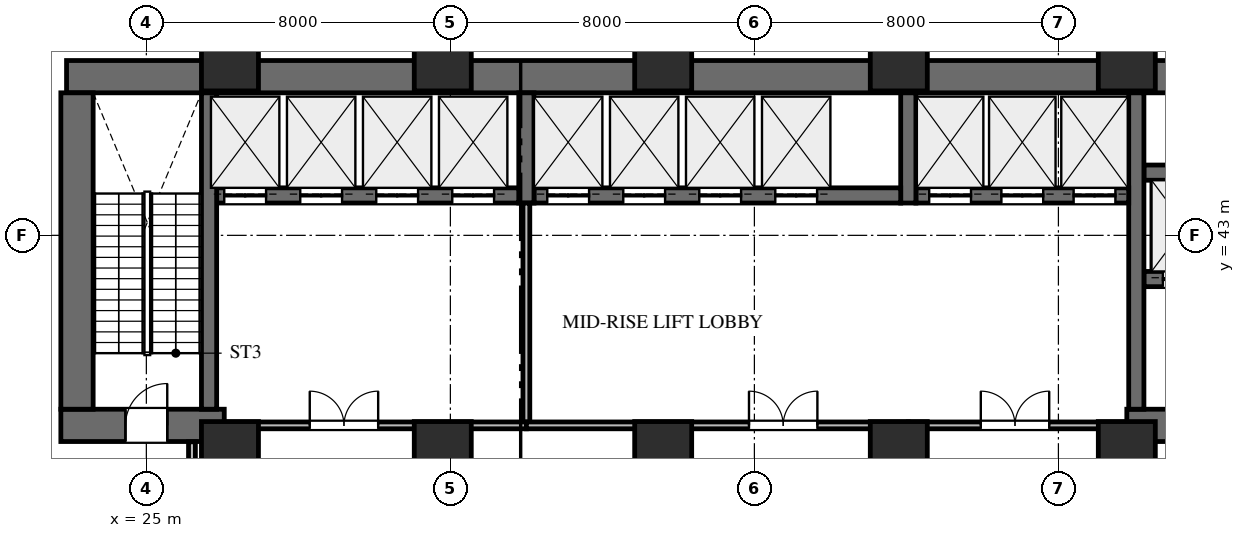
"""IFC4 building model, lengths in metres.
Left out: names, types, materials, properties, quantities, classifications, styles, units other than length and angle.
Written with IfcOpenShell. Run it as: python <this file> out.ifc"""

import sys

from ifc_helpers import new_model, si_unit, direction, frame, frame_2d, origin, origin_2d, place, context, subcontext, project, spatial, rectangle, extrude, element, fill, save


model = new_model("IFC4")
c1 = context("Model", 3, precision=1e-05, world=origin(), true_north=direction((0.0, 1.0)))
c2 = subcontext(c1, "Body", "Model", "MODEL_VIEW")
j1 = project(units=[si_unit("LENGTHUNIT", "METRE"), si_unit("PLANEANGLEUNIT", "RADIAN")], contexts=[c1])
p1 = place(None, origin())
s1 = spatial("IfcSite", under=j1, at=p1, CompositionType="ELEMENT")
p2 = place(p1, origin())
s2 = spatial("IfcBuilding", under=s1, at=p2, CompositionType="ELEMENT")
p3 = place(p2, origin())
s3 = spatial("IfcBuildingStorey", under=s2, at=p3, CompositionType="ELEMENT", Elevation=0.0)
p4 = place(p3, frame((22.9, 47.175, 0.0), z_axis=(0.0, 0.0, 1.0), x_axis=(1.0, 0.0, 0.0)))
e1 = element("IfcWall", 1, at=p4, inside=s3, PredefinedType="SHEAR", context=c2, shape_type="SweptSolid", body=[
    extrude(rectangle(XDim=43.8, YDim=0.85, at=frame_2d((21.9, 0.0))), origin(), (0.0, 0.0, 1.0), 5.4),
])
p5 = place(p3, frame((50.8, 38.0, 0.0), z_axis=(0.0, 0.0, 1.0), x_axis=(1.0, 0.0, 0.0)))
e2 = element("IfcWall", 2, at=p5, inside=s3, PredefinedType="SHEAR", context=c2, shape_type="SweptSolid", body=[
    extrude(rectangle(XDim=5.0, YDim=0.85, at=frame_2d((2.5, 0.0))), origin(), (0.0, 0.0, 1.0), 5.4),
])
p6 = place(p5, frame((2.0, 0.0, 0.0)))
e3 = element("IfcOpeningElement", 3, at=p6, cuts=e2, PredefinedType="OPENING", context=c2, shape_type="SweptSolid", body=[
    extrude(rectangle(XDim=1.2, YDim=2.2, at=frame_2d((0.6, 1.1))), frame((0.0, 0.435, 0.0), z_axis=(0.0, -1.0, 0.0), x_axis=(1.0, 0.0, 0.0)), (0.0, 0.0, 1.0), 0.87),
])
p7 = place(p3, frame((51.25, 41.85, 0.0), z_axis=(0.0, 0.0, 1.0), x_axis=(1.0, 0.0, 0.0)))
e4 = element("IfcWall", 4, at=p7, inside=s3, PredefinedType="SHEAR", context=c2, shape_type="SweptSolid", body=[
    extrude(rectangle(XDim=4.75, YDim=0.4, at=frame_2d((2.375, 0.0))), origin(), (0.0, 0.0, 1.0), 5.4),
])
p8 = place(p7, frame((0.5, 0.0, 0.0)))
e5 = element("IfcOpeningElement", 5, at=p8, cuts=e4, PredefinedType="OPENING", context=c2, shape_type="SweptSolid", body=[
    extrude(rectangle(XDim=1.2, YDim=2.2, at=frame_2d((0.6, 1.1))), frame((0.0, 0.21, 0.0), z_axis=(0.0, -1.0, 0.0), x_axis=(1.0, 0.0, 0.0)), (0.0, 0.0, 1.0), 0.42),
])
p9 = place(p7, frame((2.6, 0.0, 0.0)))
e6 = element("IfcOpeningElement", 6, at=p9, cuts=e4, PredefinedType="OPENING", context=c2, shape_type="SweptSolid", body=[
    extrude(rectangle(XDim=1.2, YDim=2.2, at=frame_2d((0.6, 1.1))), frame((0.0, 0.21, 0.0), z_axis=(0.0, -1.0, 0.0), x_axis=(1.0, 0.0, 0.0)), (0.0, 0.0, 1.0), 0.42),
])
p10 = place(p3, frame((51.25, 44.65, 0.0), z_axis=(0.0, 0.0, 1.0), x_axis=(1.0, 0.0, 0.0)))
e7 = element("IfcWall", 7, at=p10, inside=s3, PredefinedType="SHEAR", context=c2, shape_type="SweptSolid", body=[
    extrude(rectangle(XDim=4.75, YDim=0.4, at=frame_2d((2.375, 0.0))), origin(), (0.0, 0.0, 1.0), 5.4),
])
p11 = place(p3, frame((51.05, 38.425, 0.0), z_axis=(0.0, 0.0, 1.0), x_axis=(0.0, 1.0, 0.0)))
e8 = element("IfcWall", 8, at=p11, inside=s3, PredefinedType="SHEAR", context=c2, shape_type="SweptSolid", body=[
    extrude(rectangle(XDim=8.325, YDim=0.4, at=frame_2d((4.163, 0.0))), origin(), (0.0, 0.0, 1.0), 5.4),
])
p12 = place(p3, frame((45.25, 44.05, 0.0), z_axis=(0.0, 0.0, 1.0), x_axis=(1.0, 0.0, 0.0)))
e9 = element("IfcWall", 9, at=p12, inside=s3, PredefinedType="SHEAR", context=c2, shape_type="SweptSolid", body=[
    extrude(rectangle(XDim=5.6, YDim=0.4, at=frame_2d((2.8, 0.0))), origin(), (0.0, 0.0, 1.0), 5.4),
])
p13 = place(p12, frame((0.35, 0.0, 0.0)))
e10 = element("IfcOpeningElement", 10, at=p13, cuts=e9, PredefinedType="OPENING", context=c2, shape_type="SweptSolid", body=[
    extrude(rectangle(XDim=1.1, YDim=2.2, at=frame_2d((0.55, 1.1))), frame((0.0, 0.21, 0.0), z_axis=(0.0, -1.0, 0.0), x_axis=(1.0, 0.0, 0.0)), (0.0, 0.0, 1.0), 0.42),
])
p14 = place(p12, frame((2.25, 0.0, 0.0)))
e11 = element("IfcOpeningElement", 11, at=p14, cuts=e9, PredefinedType="OPENING", context=c2, shape_type="SweptSolid", body=[
    extrude(rectangle(XDim=1.1, YDim=2.2, at=frame_2d((0.55, 1.1))), frame((0.0, 0.21, 0.0), z_axis=(0.0, -1.0, 0.0), x_axis=(1.0, 0.0, 0.0)), (0.0, 0.0, 1.0), 0.42),
])
p15 = place(p12, frame((4.15, 0.0, 0.0)))
e12 = element("IfcOpeningElement", 12, at=p15, cuts=e9, PredefinedType="OPENING", context=c2, shape_type="SweptSolid", body=[
    extrude(rectangle(XDim=1.1, YDim=2.2, at=frame_2d((0.55, 1.1))), frame((0.0, 0.21, 0.0), z_axis=(0.0, -1.0, 0.0), x_axis=(1.0, 0.0, 0.0)), (0.0, 0.0, 1.0), 0.42),
])
p16 = place(p3, frame((45.05, 43.85, 0.0), z_axis=(0.0, 0.0, 1.0), x_axis=(0.0, 1.0, 0.0)))
e13 = element("IfcWall", 13, at=p16, inside=s3, PredefinedType="SHEAR", context=c2, shape_type="SweptSolid", body=[
    extrude(rectangle(XDim=2.9, YDim=0.4, at=frame_2d((1.45, 0.0))), origin(), (0.0, 0.0, 1.0), 5.4),
])
p17 = place(p3, frame((35.2, 44.05, 0.0), z_axis=(0.0, 0.0, 1.0), x_axis=(1.0, 0.0, 0.0)))
e14 = element("IfcWall", 14, at=p17, inside=s3, PredefinedType="SHEAR", context=c2, shape_type="SweptSolid", body=[
    extrude(rectangle(XDim=9.65, YDim=0.4, at=frame_2d((4.825, 0.0))), origin(), (0.0, 0.0, 1.0), 5.4),
])
p18 = place(p17, frame((0.35, 0.0, 0.0)))
e15 = element("IfcOpeningElement", 15, at=p18, cuts=e14, PredefinedType="OPENING", context=c2, shape_type="SweptSolid", body=[
    extrude(rectangle(XDim=1.1, YDim=2.2, at=frame_2d((0.55, 1.1))), frame((0.0, 0.21, 0.0), z_axis=(0.0, -1.0, 0.0), x_axis=(1.0, 0.0, 0.0)), (0.0, 0.0, 1.0), 0.42),
])
p19 = place(p17, frame((2.35, 0.0, 0.0)))
e16 = element("IfcOpeningElement", 16, at=p19, cuts=e14, PredefinedType="OPENING", context=c2, shape_type="SweptSolid", body=[
    extrude(rectangle(XDim=1.1, YDim=2.2, at=frame_2d((0.55, 1.1))), frame((0.0, 0.21, 0.0), z_axis=(0.0, -1.0, 0.0), x_axis=(1.0, 0.0, 0.0)), (0.0, 0.0, 1.0), 0.42),
])
p20 = place(p17, frame((4.35, 0.0, 0.0)))
e17 = element("IfcOpeningElement", 17, at=p20, cuts=e14, PredefinedType="OPENING", context=c2, shape_type="SweptSolid", body=[
    extrude(rectangle(XDim=1.1, YDim=2.2, at=frame_2d((0.55, 1.1))), frame((0.0, 0.21, 0.0), z_axis=(0.0, -1.0, 0.0), x_axis=(1.0, 0.0, 0.0)), (0.0, 0.0, 1.0), 0.42),
])
p21 = place(p17, frame((6.35, 0.0, 0.0)))
e18 = element("IfcOpeningElement", 18, at=p21, cuts=e14, PredefinedType="OPENING", context=c2, shape_type="SweptSolid", body=[
    extrude(rectangle(XDim=1.1, YDim=2.2, at=frame_2d((0.55, 1.1))), frame((0.0, 0.21, 0.0), z_axis=(0.0, -1.0, 0.0), x_axis=(1.0, 0.0, 0.0)), (0.0, 0.0, 1.0), 0.42),
])
p22 = place(p3, frame((35.0, 43.85, 0.0), z_axis=(0.0, 0.0, 1.0), x_axis=(0.0, 1.0, 0.0)))
e19 = element("IfcWall", 19, at=p22, inside=s3, PredefinedType="SHEAR", context=c2, shape_type="SweptSolid", body=[
    extrude(rectangle(XDim=2.9, YDim=0.4, at=frame_2d((1.45, 0.0))), origin(), (0.0, 0.0, 1.0), 5.4),
])
p23 = place(p3, frame((26.85, 44.05, 0.0), z_axis=(0.0, 0.0, 1.0), x_axis=(1.0, 0.0, 0.0)))
e20 = element("IfcWall", 20, at=p23, inside=s3, PredefinedType="SHEAR", context=c2, shape_type="SweptSolid", body=[
    extrude(rectangle(XDim=7.95, YDim=0.4, at=frame_2d((3.975, 0.0))), origin(), (0.0, 0.0, 1.0), 5.4),
])
p24 = place(p23, frame((0.2, 0.0, 0.0)))
e21 = element("IfcOpeningElement", 21, at=p24, cuts=e20, PredefinedType="OPENING", context=c2, shape_type="SweptSolid", body=[
    extrude(rectangle(XDim=1.1, YDim=2.2, at=frame_2d((0.55, 1.1))), frame((0.0, 0.21, 0.0), z_axis=(0.0, -1.0, 0.0), x_axis=(1.0, 0.0, 0.0)), (0.0, 0.0, 1.0), 0.42),
])
p25 = place(p23, frame((2.2, 0.0, 0.0)))
e22 = element("IfcOpeningElement", 22, at=p25, cuts=e20, PredefinedType="OPENING", context=c2, shape_type="SweptSolid", body=[
    extrude(rectangle(XDim=1.1, YDim=2.2, at=frame_2d((0.55, 1.1))), frame((0.0, 0.21, 0.0), z_axis=(0.0, -1.0, 0.0), x_axis=(1.0, 0.0, 0.0)), (0.0, 0.0, 1.0), 0.42),
])
p26 = place(p23, frame((4.2, 0.0, 0.0)))
e23 = element("IfcOpeningElement", 23, at=p26, cuts=e20, PredefinedType="OPENING", context=c2, shape_type="SweptSolid", body=[
    extrude(rectangle(XDim=1.1, YDim=2.2, at=frame_2d((0.55, 1.1))), frame((0.0, 0.21, 0.0), z_axis=(0.0, -1.0, 0.0), x_axis=(1.0, 0.0, 0.0)), (0.0, 0.0, 1.0), 0.42),
])
p27 = place(p23, frame((6.2, 0.0, 0.0)))
e24 = element("IfcOpeningElement", 24, at=p27, cuts=e20, PredefinedType="OPENING", context=c2, shape_type="SweptSolid", body=[
    extrude(rectangle(XDim=1.1, YDim=2.2, at=frame_2d((0.55, 1.1))), frame((0.0, 0.21, 0.0), z_axis=(0.0, -1.0, 0.0), x_axis=(1.0, 0.0, 0.0)), (0.0, 0.0, 1.0), 0.42),
])
p28 = place(p3, frame((22.75, 38.0, 0.0), z_axis=(0.0, 0.0, 1.0), x_axis=(1.0, 0.0, 0.0)))
e25 = element("IfcWall", 25, at=p28, inside=s3, PredefinedType="SHEAR", context=c2, shape_type="SweptSolid", body=[
    extrude(rectangle(XDim=4.3, YDim=0.85, at=frame_2d((2.15, 0.0))), origin(), (0.0, 0.0, 1.0), 5.4),
])
p29 = place(p28, frame((1.7, 0.0, 0.0)))
e26 = element("IfcOpeningElement", 26, at=p29, cuts=e25, PredefinedType="OPENING", context=c2, shape_type="SweptSolid", body=[
    extrude(rectangle(XDim=1.1, YDim=2.2, at=frame_2d((0.55, 1.1))), frame((0.0, 0.435, 0.0), z_axis=(0.0, -1.0, 0.0), x_axis=(1.0, 0.0, 0.0)), (0.0, 0.0, 1.0), 0.87),
])
p30 = place(p3, frame((23.175, 38.425, 0.0), z_axis=(0.0, 0.0, 1.0), x_axis=(0.0, 1.0, 0.0)))
e27 = element("IfcWall", 27, at=p30, inside=s3, PredefinedType="SHEAR", context=c2, shape_type="SweptSolid", body=[
    extrude(rectangle(XDim=8.325, YDim=0.85, at=frame_2d((4.163, 0.0))), origin(), (0.0, 0.0, 1.0), 5.4),
])
p31 = place(p3, frame((26.65, 38.425, 0.0), z_axis=(0.0, 0.0, 1.0), x_axis=(0.0, 1.0, 0.0)))
e28 = element("IfcWall", 28, at=p31, inside=s3, PredefinedType="SHEAR", context=c2, shape_type="SweptSolid", body=[
    extrude(rectangle(XDim=8.325, YDim=0.4, at=frame_2d((4.163, 0.0))), origin(), (0.0, 0.0, 1.0), 5.4),
])
for number, where, z_axis, x_axis in (
    (29, (50.8, 47.55, 0.0), (0.0, 0.0, 1.0), (1.0, 0.0, 0.0)),
    (30, (50.8, 37.35, 0.0), (0.0, 0.0, 1.0), (1.0, 0.0, 0.0)),
    (31, (44.8, 37.35, 0.0), (0.0, 0.0, 1.0), (1.0, 0.0, 0.0)),
    (32, (44.8, 47.55, 0.0), (0.0, 0.0, 1.0), (1.0, 0.0, 0.0)),
    (33, (38.6, 37.35, 0.0), (0.0, 0.0, 1.0), (1.0, 0.0, 0.0)),
    (34, (38.6, 47.55, 0.0), (0.0, 0.0, 1.0), (1.0, 0.0, 0.0)),
    (35, (32.8, 37.35, 0.0), (0.0, 0.0, 1.0), (1.0, 0.0, 0.0)),
    (36, (32.8, 47.55, 0.0), (0.0, 0.0, 1.0), (1.0, 0.0, 0.0)),
    (37, (27.2, 37.35, 0.0), (0.0, 0.0, 1.0), (1.0, 0.0, 0.0)),
    (38, (27.2, 47.55, 0.0), (0.0, 0.0, 1.0), (1.0, 0.0, 0.0)),
):
    element("IfcColumn", number, at=place(p3, frame(where, z_axis=z_axis, x_axis=x_axis)), inside=s3, PredefinedType="COLUMN", context=c2, shape_type="SweptSolid", body=[
        extrude(rectangle(XDim=1.5, YDim=1.5, at=origin_2d()), origin(), (0.0, 0.0, 1.0), 5.4),
    ])
p32 = place(p3, frame((45.05, 38.0, 0.0), z_axis=(0.0, 0.0, 1.0), x_axis=(1.0, 0.0, 0.0)))
e39 = element("IfcWall", 39, at=p32, inside=s3, PredefinedType="STANDARD", context=c2, shape_type="SweptSolid", body=[
    extrude(rectangle(XDim=5.75, YDim=0.18, at=frame_2d((2.875, 0.0))), origin(), (0.0, 0.0, 1.0), 4.182),
])
p33 = place(p32, frame((1.908, 0.0, 0.0)))
e40 = element("IfcOpeningElement", 40, at=p33, cuts=e39, PredefinedType="OPENING", context=c2, shape_type="SweptSolid", body=[
    extrude(rectangle(XDim=1.8, YDim=2.2, at=frame_2d((0.9, 1.1))), frame((0.0, 0.1, 0.0), z_axis=(0.0, -1.0, 0.0), x_axis=(1.0, 0.0, 0.0)), (0.0, 0.0, 1.0), 0.2),
])
p34 = place(p3, frame((35.0, 38.0, 0.0), z_axis=(0.0, 0.0, 1.0), x_axis=(0.0, 1.0, 0.0)))
e41 = element("IfcWall", 41, at=p34, inside=s3, PredefinedType="STANDARD", context=c2, shape_type="SweptSolid", body=[
    extrude(rectangle(XDim=5.85, YDim=0.18, at=frame_2d((2.925, 0.0))), origin(), (0.0, 0.0, 1.0), 5.13),
])
p35 = place(p3, frame((27.05, 38.0, 0.0), z_axis=(0.0, 0.0, 1.0), x_axis=(1.0, 0.0, 0.0)))
e42 = element("IfcWall", 42, at=p35, inside=s3, PredefinedType="STANDARD", context=c2, shape_type="SweptSolid", body=[
    extrude(rectangle(XDim=7.95, YDim=0.18, at=frame_2d((3.975, 0.0))), origin(), (0.0, 0.0, 1.0), 4.182),
])
p36 = place(p35, frame((2.25, 0.0, 0.0)))
e43 = element("IfcOpeningElement", 43, at=p36, cuts=e42, PredefinedType="OPENING", context=c2, shape_type="SweptSolid", body=[
    extrude(rectangle(XDim=1.8, YDim=2.2, at=frame_2d((0.9, 1.1))), frame((0.0, 0.1, 0.0), z_axis=(0.0, -1.0, 0.0), x_axis=(1.0, 0.0, 0.0)), (0.0, 0.0, 1.0), 0.2),
])
p37 = place(p3, frame((35.0, 38.0, 0.0), z_axis=(0.0, 0.0, 1.0), x_axis=(1.0, 0.0, 0.0)))
e44 = element("IfcWall", 44, at=p37, inside=s3, PredefinedType="STANDARD", context=c2, shape_type="SweptSolid", body=[
    extrude(rectangle(XDim=10.05, YDim=0.18, at=frame_2d((5.025, 0.0))), origin(), (0.0, 0.0, 1.0), 4.182),
])
p38 = place(p37, frame((5.858, 0.0, 0.0)))
e45 = element("IfcOpeningElement", 45, at=p38, cuts=e44, PredefinedType="OPENING", context=c2, shape_type="SweptSolid", body=[
    extrude(rectangle(XDim=1.8, YDim=2.2, at=frame_2d((0.9, 1.1))), frame((0.0, 0.1, 0.0), z_axis=(0.0, -1.0, 0.0), x_axis=(1.0, 0.0, 0.0)), (0.0, 0.0, 1.0), 0.2),
])
p39 = place(p3, frame((51.2, 34.4, 0.0), z_axis=(0.0, 0.0, 1.0), x_axis=(0.0, 1.0, 0.0)))
e46 = element("IfcWall", 46, at=p39, inside=s3, PredefinedType="STANDARD", context=c2, shape_type="SweptSolid", body=[
    extrude(rectangle(XDim=3.167, YDim=0.18, at=frame_2d((1.583, 0.0))), origin(), (0.0, 0.0, 1.0), 4.823),
])
p40 = place(p39, frame((0.785, 0.0, 0.0)))
e47 = element("IfcOpeningElement", 47, at=p40, cuts=e46, PredefinedType="OPENING", context=c2, shape_type="SweptSolid", body=[
    extrude(rectangle(XDim=1.1, YDim=2.2, at=frame_2d((0.55, 1.1))), frame((0.0, 0.1, 0.0), z_axis=(0.0, -1.0, 0.0), x_axis=(1.0, 0.0, 0.0)), (0.0, 0.0, 1.0), 0.2),
])
p41 = place(p3, frame((26.2, 34.4, 0.0), z_axis=(0.0, 0.0, 1.0), x_axis=(0.0, 1.0, 0.0)))
e48 = element("IfcWall", 48, at=p41, inside=s3, PredefinedType="STANDARD", context=c2, shape_type="SweptSolid", body=[
    extrude(rectangle(XDim=3.167, YDim=0.18, at=frame_2d((1.583, 0.0))), origin(), (0.0, 0.0, 1.0), 4.182),
])
p42 = place(p41, frame((0.785, 0.0, 0.0)))
e49 = element("IfcOpeningElement", 49, at=p42, cuts=e48, PredefinedType="OPENING", context=c2, shape_type="SweptSolid", body=[
    extrude(rectangle(XDim=1.1, YDim=2.2, at=frame_2d((0.55, 1.1))), frame((0.0, 0.1, 0.0), z_axis=(0.0, -1.0, 0.0), x_axis=(1.0, 0.0, 0.0)), (0.0, 0.0, 1.0), 0.2),
])
p43 = place(p29, origin())
e50 = element("IfcDoor", 50, at=p43, inside=s3, OperationType="SINGLE_SWING_RIGHT", PredefinedType="DOOR", context=c2, shape_type="SweptSolid", body=[
    extrude(rectangle(XDim=1.1, YDim=2.2, at=frame_2d((0.55, 1.1))), frame((0.0, 0.025, 0.0), z_axis=(0.0, -1.0, 0.0), x_axis=(1.0, 0.0, 0.0)), (0.0, 0.0, 1.0), 0.05),
])
fill(e26, e50)
p44 = place(p24, origin())
e51 = element("IfcDoor", 51, at=p44, inside=s3, OperationType="DOUBLE_DOOR_SLIDING", PredefinedType="DOOR", context=c2, shape_type="SweptSolid", body=[
    extrude(rectangle(XDim=1.1, YDim=2.2, at=frame_2d((0.55, 1.1))), frame((0.0, 0.025, 0.0), z_axis=(0.0, -1.0, 0.0), x_axis=(1.0, 0.0, 0.0)), (0.0, 0.0, 1.0), 0.05),
])
fill(e21, e51)
p45 = place(p25, origin())
e52 = element("IfcDoor", 52, at=p45, inside=s3, OperationType="DOUBLE_DOOR_SLIDING", PredefinedType="DOOR", context=c2, shape_type="SweptSolid", body=[
    extrude(rectangle(XDim=1.1, YDim=2.2, at=frame_2d((0.55, 1.1))), frame((0.0, 0.025, 0.0), z_axis=(0.0, -1.0, 0.0), x_axis=(1.0, 0.0, 0.0)), (0.0, 0.0, 1.0), 0.05),
])
fill(e22, e52)
p46 = place(p26, origin())
e53 = element("IfcDoor", 53, at=p46, inside=s3, OperationType="DOUBLE_DOOR_SLIDING", PredefinedType="DOOR", context=c2, shape_type="SweptSolid", body=[
    extrude(rectangle(XDim=1.1, YDim=2.2, at=frame_2d((0.55, 1.1))), frame((0.0, 0.025, 0.0), z_axis=(0.0, -1.0, 0.0), x_axis=(1.0, 0.0, 0.0)), (0.0, 0.0, 1.0), 0.05),
])
fill(e23, e53)
p47 = place(p27, origin())
e54 = element("IfcDoor", 54, at=p47, inside=s3, OperationType="DOUBLE_DOOR_SLIDING", PredefinedType="DOOR", context=c2, shape_type="SweptSolid", body=[
    extrude(rectangle(XDim=1.1, YDim=2.2, at=frame_2d((0.55, 1.1))), frame((0.0, 0.025, 0.0), z_axis=(0.0, -1.0, 0.0), x_axis=(1.0, 0.0, 0.0)), (0.0, 0.0, 1.0), 0.05),
])
fill(e24, e54)
p48 = place(p18, origin())
e55 = element("IfcDoor", 55, at=p48, inside=s3, OperationType="DOUBLE_DOOR_SLIDING", PredefinedType="DOOR", context=c2, shape_type="SweptSolid", body=[
    extrude(rectangle(XDim=1.1, YDim=2.2, at=frame_2d((0.55, 1.1))), frame((0.0, 0.025, 0.0), z_axis=(0.0, -1.0, 0.0), x_axis=(1.0, 0.0, 0.0)), (0.0, 0.0, 1.0), 0.05),
])
fill(e15, e55)
p49 = place(p19, origin())
e56 = element("IfcDoor", 56, at=p49, inside=s3, OperationType="DOUBLE_DOOR_SLIDING", PredefinedType="DOOR", context=c2, shape_type="SweptSolid", body=[
    extrude(rectangle(XDim=1.1, YDim=2.2, at=frame_2d((0.55, 1.1))), frame((0.0, 0.025, 0.0), z_axis=(0.0, -1.0, 0.0), x_axis=(1.0, 0.0, 0.0)), (0.0, 0.0, 1.0), 0.05),
])
fill(e16, e56)
p50 = place(p20, origin())
e57 = element("IfcDoor", 57, at=p50, inside=s3, OperationType="DOUBLE_DOOR_SLIDING", PredefinedType="DOOR", context=c2, shape_type="SweptSolid", body=[
    extrude(rectangle(XDim=1.1, YDim=2.2, at=frame_2d((0.55, 1.1))), frame((0.0, 0.025, 0.0), z_axis=(0.0, -1.0, 0.0), x_axis=(1.0, 0.0, 0.0)), (0.0, 0.0, 1.0), 0.05),
])
fill(e17, e57)
p51 = place(p21, origin())
e58 = element("IfcDoor", 58, at=p51, inside=s3, OperationType="DOUBLE_DOOR_SLIDING", PredefinedType="DOOR", context=c2, shape_type="SweptSolid", body=[
    extrude(rectangle(XDim=1.1, YDim=2.2, at=frame_2d((0.55, 1.1))), frame((0.0, 0.025, 0.0), z_axis=(0.0, -1.0, 0.0), x_axis=(1.0, 0.0, 0.0)), (0.0, 0.0, 1.0), 0.05),
])
fill(e18, e58)
p52 = place(p13, origin())
e59 = element("IfcDoor", 59, at=p52, inside=s3, OperationType="DOUBLE_DOOR_SLIDING", PredefinedType="DOOR", context=c2, shape_type="SweptSolid", body=[
    extrude(rectangle(XDim=1.1, YDim=2.2, at=frame_2d((0.55, 1.1))), frame((0.0, 0.025, 0.0), z_axis=(0.0, -1.0, 0.0), x_axis=(1.0, 0.0, 0.0)), (0.0, 0.0, 1.0), 0.05),
])
fill(e10, e59)
p53 = place(p14, origin())
e60 = element("IfcDoor", 60, at=p53, inside=s3, OperationType="DOUBLE_DOOR_SLIDING", PredefinedType="DOOR", context=c2, shape_type="SweptSolid", body=[
    extrude(rectangle(XDim=1.1, YDim=2.2, at=frame_2d((0.55, 1.1))), frame((0.0, 0.025, 0.0), z_axis=(0.0, -1.0, 0.0), x_axis=(1.0, 0.0, 0.0)), (0.0, 0.0, 1.0), 0.05),
])
fill(e11, e60)
p54 = place(p15, origin())
e61 = element("IfcDoor", 61, at=p54, inside=s3, OperationType="DOUBLE_DOOR_SLIDING", PredefinedType="DOOR", context=c2, shape_type="SweptSolid", body=[
    extrude(rectangle(XDim=1.1, YDim=2.2, at=frame_2d((0.55, 1.1))), frame((0.0, 0.025, 0.0), z_axis=(0.0, -1.0, 0.0), x_axis=(1.0, 0.0, 0.0)), (0.0, 0.0, 1.0), 0.05),
])
fill(e12, e61)
p55 = place(p8, origin())
e62 = element("IfcDoor", 62, at=p55, inside=s3, OperationType="DOUBLE_DOOR_SLIDING", PredefinedType="DOOR", context=c2, shape_type="SweptSolid", body=[
    extrude(rectangle(XDim=1.2, YDim=2.2, at=frame_2d((0.6, 1.1))), frame((0.0, 0.025, 0.0), z_axis=(0.0, -1.0, 0.0), x_axis=(1.0, 0.0, 0.0)), (0.0, 0.0, 1.0), 0.05),
])
fill(e5, e62)
p56 = place(p33, origin())
e63 = element("IfcDoor", 63, at=p56, inside=s3, OperationType="DOUBLE_DOOR_SINGLE_SWING", PredefinedType="DOOR", context=c2, shape_type="SweptSolid", body=[
    extrude(rectangle(XDim=1.8, YDim=2.2, at=frame_2d((0.9, 1.1))), frame((0.0, 0.025, 0.0), z_axis=(0.0, -1.0, 0.0), x_axis=(1.0, 0.0, 0.0)), (0.0, 0.0, 1.0), 0.05),
])
fill(e40, e63)
p57 = place(p36, origin())
e64 = element("IfcDoor", 64, at=p57, inside=s3, OperationType="DOUBLE_DOOR_SINGLE_SWING", PredefinedType="DOOR", context=c2, shape_type="SweptSolid", body=[
    extrude(rectangle(XDim=1.8, YDim=2.2, at=frame_2d((0.9, 1.1))), frame((0.0, 0.025, 0.0), z_axis=(0.0, -1.0, 0.0), x_axis=(1.0, 0.0, 0.0)), (0.0, 0.0, 1.0), 0.05),
])
fill(e43, e64)
p58 = place(p38, origin())
e65 = element("IfcDoor", 65, at=p58, inside=s3, OperationType="DOUBLE_DOOR_SINGLE_SWING", PredefinedType="DOOR", context=c2, shape_type="SweptSolid", body=[
    extrude(rectangle(XDim=1.8, YDim=2.2, at=frame_2d((0.9, 1.1))), frame((0.0, 0.025, 0.0), z_axis=(0.0, -1.0, 0.0), x_axis=(1.0, 0.0, 0.0)), (0.0, 0.0, 1.0), 0.05),
])
fill(e45, e65)
save(model, sys.argv[1])
